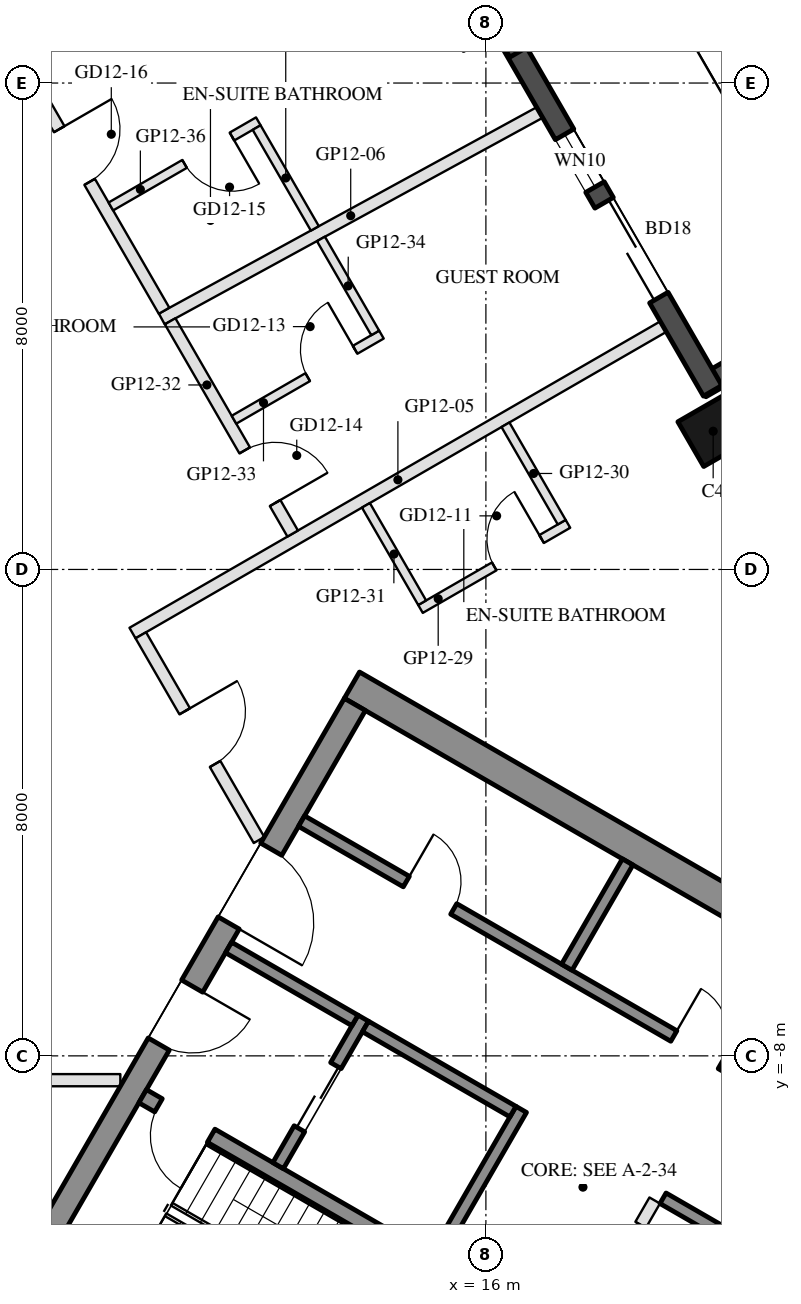
"""IFC4 building model, lengths in metres.
Left out: names, types, materials, properties, quantities, classifications, styles, units other than length and angle.
Written with IfcOpenShell. Run it as: python <this file> out.ifc"""

import sys

from ifc_helpers import new_model, si_unit, direction, frame, frame_2d, origin, origin_2d, place, context, subcontext, project, spatial, rectangle, hollow_rectangle, extrude, element, fill, save


model = new_model("IFC4")
c1 = context("Model", 3, precision=1e-05, world=origin(), true_north=direction((0.0, 1.0)))
c2 = subcontext(c1, "Body", "Model", "MODEL_VIEW")
j1 = project(units=[si_unit("LENGTHUNIT", "METRE"), si_unit("PLANEANGLEUNIT", "RADIAN")], contexts=[c1])
p1 = place(None, origin())
s1 = spatial("IfcSite", under=j1, at=p1, CompositionType="ELEMENT")
p2 = place(p1, origin())
s2 = spatial("IfcBuilding", under=s1, at=p2, CompositionType="ELEMENT")
p3 = place(p2, frame((0.0, 0.0, 150.3)))
s3 = spatial("IfcBuildingStorey", under=s2, at=p3, CompositionType="ELEMENT", Elevation=150.3)
p4 = place(p3, frame((19.738, 2.273, 0.0), z_axis=(0.0, 0.0, 1.0), x_axis=(-0.5, 0.866025403784, 0.0)))
e1 = element("IfcColumn", 1, at=p4, inside=s3, PredefinedType="COLUMN", context=c2, shape_type="SweptSolid", body=[
    extrude(hollow_rectangle(XDim=0.85, YDim=0.85, WallThickness=0.04, at=origin_2d()), origin(), (0.0, 0.0, 1.0), 3.7),
])
p5 = place(p3, frame((20.588, 3.601, 0.0), z_axis=(0.0, 0.0, 1.0), x_axis=(-0.866005645448, -0.500034220881, 0.0)))
e2 = element("IfcWall", 2, at=p5, inside=s3, PredefinedType="SOLIDWALL", context=c2, shape_type="SweptSolid", body=[
    extrude(rectangle(XDim=1.22, YDim=0.35, at=frame_2d((0.61, 0.0))), origin(), (0.0, 0.0, 1.0), 3.55),
])
p6 = place(p3, frame((19.729, 2.938, 0.0), z_axis=(0.0, 0.0, 1.0), x_axis=(-0.499976430342, 0.866039011305, 0.0)))
e3 = element("IfcWall", 3, at=p6, inside=s3, PredefinedType="SOLIDWALL", context=c2, shape_type="SweptSolid", body=[
    extrude(rectangle(XDim=6.74, YDim=0.35, at=frame_2d((3.37, 0.0))), origin(), (0.0, 0.0, 1.0), 3.55),
])
p7 = place(p6, frame((1.77, 0.0, 0.0)))
e4 = element("IfcOpeningElement", 4, at=p7, cuts=e3, PredefinedType="OPENING", context=c2, shape_type="SweptSolid", body=[
    extrude(rectangle(XDim=1.8, YDim=2.4, at=frame_2d((0.9, 1.2))), frame((0.0, 0.185, 0.0), z_axis=(0.0, -1.0, 0.0), x_axis=(1.0, 0.0, 0.0)), (0.0, 0.0, 1.0), 0.37),
])
p8 = place(p6, frame((3.87, 0.0, 0.3)))
e5 = element("IfcOpeningElement", 5, at=p8, cuts=e3, PredefinedType="OPENING", context=c2, shape_type="SweptSolid", body=[
    extrude(rectangle(XDim=1.0, YDim=2.65, at=frame_2d((0.5, 1.325))), frame((0.0, 0.185, 0.0), z_axis=(0.0, -1.0, 0.0), x_axis=(1.0, 0.0, 0.0)), (0.0, 0.0, 1.0), 0.37),
])
p9 = place(p3, frame((16.306, 8.577, 0.0), z_axis=(0.0, 0.0, 1.0), x_axis=(0.866092288191, 0.499884134912, 0.0)))
e6 = element("IfcWall", 6, at=p9, inside=s3, PredefinedType="SOLIDWALL", context=c2, shape_type="SweptSolid", body=[
    extrude(rectangle(XDim=1.22, YDim=0.35, at=frame_2d((0.61, 0.0))), origin(), (0.0, 0.0, 1.0), 3.55),
])
p10 = place(p3, frame((13.797, -1.903, 0.0), z_axis=(0.0, 0.0, 1.0), x_axis=(0.866025009528, -0.500000682871, 0.0)))
e7 = element("IfcWall", 7, at=p10, inside=s3, PredefinedType="SHEAR", context=c2, shape_type="SweptSolid", body=[
    extrude(rectangle(XDim=14.837, YDim=0.5, at=frame_2d((7.418, 0.0))), origin(), (0.0, 0.0, 1.0), 3.5),
])
p11 = place(p3, frame((8.845, -10.88, 0.0), z_axis=(0.0, 0.0, 1.0), x_axis=(0.500004234368, 0.866022959057, 0.0)))
e8 = element("IfcWall", 8, at=p11, inside=s3, PredefinedType="SHEAR", context=c2, shape_type="SweptSolid", body=[
    extrude(rectangle(XDim=10.0, YDim=0.4, at=frame_2d((5.0, 0.0))), origin(), (0.0, 0.0, 1.0), 3.5),
])
p12 = place(p11, frame((3.55, 0.0, 0.0)))
e9 = element("IfcOpeningElement", 9, at=p12, cuts=e8, PredefinedType="OPENING", context=c2, shape_type="SweptSolid", body=[
    extrude(rectangle(XDim=1.1, YDim=2.1, at=frame_2d((0.55, 1.05))), frame((0.0, 0.21, 0.0), z_axis=(0.0, -1.0, 0.0), x_axis=(1.0, 0.0, 0.0)), (0.0, 0.0, 1.0), 0.42),
])
p13 = place(p11, frame((5.85, 0.0, 0.0)))
e10 = element("IfcOpeningElement", 10, at=p13, cuts=e8, PredefinedType="OPENING", context=c2, shape_type="SweptSolid", body=[
    extrude(rectangle(XDim=1.4, YDim=2.1, at=frame_2d((0.7, 1.05))), frame((0.0, 0.21, 0.0), z_axis=(0.0, -1.0, 0.0), x_axis=(1.0, 0.0, 0.0)), (0.0, 0.0, 1.0), 0.42),
])
p14 = place(p3, frame((10.356, -8.664, 0.0), z_axis=(0.0, 0.0, 1.0), x_axis=(0.866028629588, -0.499994412703, 0.0)))
e11 = element("IfcWall", 11, at=p14, inside=s3, PredefinedType="SHEAR", context=c2, shape_type="SweptSolid", body=[
    extrude(rectangle(XDim=6.45, YDim=0.25, at=frame_2d((3.225, 0.0))), origin(), (0.0, 0.0, 1.0), 3.5),
])
p15 = place(p14, frame((0.3, 0.0, 0.0)))
e12 = element("IfcOpeningElement", 12, at=p15, cuts=e11, PredefinedType="OPENING", context=c2, shape_type="SweptSolid", body=[
    extrude(rectangle(XDim=1.0, YDim=2.1, at=frame_2d((0.5, 1.05))), frame((0.0, 0.135, 0.0), z_axis=(0.0, -1.0, 0.0), x_axis=(1.0, 0.0, 0.0)), (0.0, 0.0, 1.0), 0.27),
])
p16 = place(p3, frame((15.181, -11.305, 0.0), z_axis=(0.0, 0.0, 1.0), x_axis=(0.49994636267, 0.866056369097, 0.0)))
e13 = element("IfcWall", 13, at=p16, inside=s3, PredefinedType="SHEAR", context=c2, shape_type="SweptSolid", body=[
    extrude(rectangle(XDim=2.8, YDim=0.2, at=frame_2d((1.4, 0.0))), origin(), (0.0, 0.0, 1.0), 3.5),
])
p17 = place(p3, frame((12.583, -9.805, 0.0), z_axis=(0.0, 0.0, 1.0), x_axis=(0.49994636267, 0.866056369097, 0.0)))
e14 = element("IfcWall", 14, at=p17, inside=s3, PredefinedType="SHEAR", context=c2, shape_type="SweptSolid", body=[
    extrude(rectangle(XDim=2.8, YDim=0.2, at=frame_2d((1.4, 0.0))), origin(), (0.0, 0.0, 1.0), 3.5),
])
p18 = place(p17, frame((0.7, 0.0, 0.0)))
e15 = element("IfcOpeningElement", 15, at=p18, cuts=e14, PredefinedType="OPENING", context=c2, shape_type="SweptSolid", body=[
    extrude(rectangle(XDim=1.2, YDim=2.1, at=frame_2d((0.6, 1.05))), frame((0.0, 0.11, 0.0), z_axis=(0.0, -1.0, 0.0), x_axis=(1.0, 0.0, 0.0)), (0.0, 0.0, 1.0), 0.22),
])
p19 = place(p3, frame((11.768, -6.217, 0.0), z_axis=(0.0, 0.0, 1.0), x_axis=(0.866050077142, -0.499957262057, 0.0)))
e16 = element("IfcWall", 16, at=p19, inside=s3, PredefinedType="SHEAR", context=c2, shape_type="SweptSolid", body=[
    extrude(rectangle(XDim=2.4, YDim=0.2, at=frame_2d((1.2, 0.0))), origin(), (0.0, 0.0, 1.0), 3.5),
])
p20 = place(p3, frame((14.02, -7.517, 0.0), z_axis=(0.0, 0.0, 1.0), x_axis=(0.866034573852, -0.49998411664, 0.0)))
e17 = element("IfcWall", 17, at=p20, inside=s3, PredefinedType="SHEAR", context=c2, shape_type="SweptSolid", body=[
    extrude(rectangle(XDim=2.8, YDim=0.2, at=frame_2d((1.4, 0.0))), origin(), (0.0, 0.0, 1.0), 3.5),
])
p21 = place(p3, frame((12.968, -4.138, 0.0), z_axis=(0.0, 0.0, 1.0), x_axis=(0.866028328073, -0.49999493495, 0.0)))
e18 = element("IfcWall", 18, at=p21, inside=s3, PredefinedType="SHEAR", context=c2, shape_type="SweptSolid", body=[
    extrude(rectangle(XDim=10.16, YDim=0.2, at=frame_2d((5.08, 0.0))), origin(), (0.0, 0.0, 1.0), 3.5),
])
p22 = place(p21, frame((1.99, 0.0, 0.0)))
e19 = element("IfcOpeningElement", 19, at=p22, cuts=e18, PredefinedType="OPENING", context=c2, shape_type="SweptSolid", body=[
    extrude(rectangle(XDim=0.9, YDim=2.1, at=frame_2d((0.45, 1.05))), frame((0.0, 0.11, 0.0), z_axis=(0.0, -1.0, 0.0), x_axis=(1.0, 0.0, 0.0)), (0.0, 0.0, 1.0), 0.22),
])
p23 = place(p21, frame((7.07, 0.0, 0.0)))
e20 = element("IfcOpeningElement", 20, at=p23, cuts=e18, PredefinedType="OPENING", context=c2, shape_type="SweptSolid", body=[
    extrude(rectangle(XDim=0.9, YDim=2.1, at=frame_2d((0.45, 1.05))), frame((0.0, 0.11, 0.0), z_axis=(0.0, -1.0, 0.0), x_axis=(1.0, 0.0, 0.0)), (0.0, 0.0, 1.0), 0.22),
])
p24 = place(p3, frame((18.913, -10.342, 0.0), z_axis=(0.0, 0.0, 1.0), x_axis=(0.866038183914, -0.499977863513, 0.0)))
e21 = element("IfcWall", 21, at=p24, inside=s3, PredefinedType="SHEAR", context=c2, shape_type="SweptSolid", body=[
    extrude(rectangle(XDim=1.71, YDim=0.2, at=frame_2d((0.855, 0.0))), origin(), (0.0, 0.0, 1.0), 3.5),
])
p25 = place(p3, frame((17.331, -6.542, 0.0), z_axis=(0.0, 0.0, 1.0), x_axis=(0.499972520799, 0.866041268327, 0.0)))
e22 = element("IfcWall", 22, at=p25, inside=s3, PredefinedType="SHEAR", context=c2, shape_type="SweptSolid", body=[
    extrude(rectangle(XDim=2.0, YDim=0.2, at=frame_2d((1.0, 0.0))), origin(), (0.0, 0.0, 1.0), 3.5),
])
p26 = place(p3, frame((16.076, -15.055, 0.0), z_axis=(0.0, 0.0, 1.0), x_axis=(0.499995103361, 0.866028230842, 0.0)))
e23 = element("IfcWall", 23, at=p26, inside=s3, PredefinedType="PARTITIONING", context=c2, shape_type="SweptSolid", body=[
    extrude(rectangle(XDim=5.4, YDim=0.2, at=frame_2d((2.7, 0.0))), origin(), (0.0, 0.0, 1.0), 3.5),
])
p27 = place(p26, frame((2.163, 0.0, 0.0)))
e24 = element("IfcOpeningElement", 24, at=p27, cuts=e23, PredefinedType="OPENING", context=c2, shape_type="SweptSolid", body=[
    extrude(rectangle(XDim=0.9, YDim=2.1, at=frame_2d((0.45, 1.05))), frame((0.0, 0.11, 0.0), z_axis=(0.0, -1.0, 0.0), x_axis=(1.0, 0.0, 0.0)), (0.0, 0.0, 1.0), 0.22),
])
p28 = place(p26, frame((4.038, 0.0, 0.0)))
e25 = element("IfcOpeningElement", 25, at=p28, cuts=e23, PredefinedType="OPENING", context=c2, shape_type="SweptSolid", body=[
    extrude(rectangle(XDim=0.9, YDim=2.1, at=frame_2d((0.45, 1.05))), frame((0.0, 0.11, 0.0), z_axis=(0.0, -1.0, 0.0), x_axis=(1.0, 0.0, 0.0)), (0.0, 0.0, 1.0), 0.22),
])
p29 = place(p3, frame((18.917, 3.994, 0.0), z_axis=(0.0, 0.0, 1.0), x_axis=(-0.866022637375, -0.500004791531, 0.0)))
e26 = element("IfcWall", 26, at=p29, inside=s3, PredefinedType="PARTITIONING", context=c2, shape_type="SweptSolid", body=[
    extrude(rectangle(XDim=10.08, YDim=0.2, at=frame_2d((5.04, 0.0))), origin(), (0.0, 0.0, 1.0), 3.06),
])
p30 = place(p3, frame((16.885, 7.515, 0.0), z_axis=(0.0, 0.0, 1.0), x_axis=(-0.87760821498, -0.479378577952, 0.0)))
e27 = element("IfcWall", 27, at=p30, inside=s3, PredefinedType="PARTITIONING", context=c2, shape_type="SweptSolid", body=[
    extrude(rectangle(XDim=7.082, YDim=0.2, at=frame_2d((3.541, 0.0))), origin(), (0.0, 0.0, 1.0), 3.06),
])
p31 = place(p3, frame((9.988, -8.4, 0.0), z_axis=(0.0, 0.0, 1.0), x_axis=(-1.0, 0.0, 0.0)))
e28 = element("IfcWall", 28, at=p31, inside=s3, PredefinedType="PARTITIONING", context=c2, shape_type="SweptSolid", body=[
    extrude(rectangle(XDim=3.788, YDim=0.2, at=frame_2d((1.894, 0.0))), origin(), (0.0, 0.0, 1.0), 2.95),
])
p32 = place(p31, frame((1.394, 0.0, 0.0)))
e29 = element("IfcOpeningElement", 29, at=p32, cuts=e28, PredefinedType="OPENING", context=c2, shape_type="SweptSolid", body=[
    extrude(rectangle(XDim=1.0, YDim=2.1, at=frame_2d((0.5, 1.05))), frame((0.0, 0.11, 0.0), z_axis=(0.0, -1.0, 0.0), x_axis=(1.0, 0.0, 0.0)), (0.0, 0.0, 1.0), 0.22),
])
p33 = place(p3, frame((10.325, -1.083, 0.0), z_axis=(0.0, 0.0, 1.0), x_axis=(0.500008716408, -0.866020371305, 0.0)))
e30 = element("IfcWall", 30, at=p33, inside=s3, PredefinedType="PARTITIONING", context=c2, shape_type="SweptSolid", body=[
    extrude(rectangle(XDim=3.888, YDim=0.2, at=frame_2d((1.944, 0.0))), origin(), (0.0, 0.0, 1.0), 2.95),
])
p34 = place(p33, frame((1.444, 0.0, 0.0)))
e31 = element("IfcOpeningElement", 31, at=p34, cuts=e30, PredefinedType="OPENING", context=c2, shape_type="SweptSolid", body=[
    extrude(rectangle(XDim=1.0, YDim=2.1, at=frame_2d((0.5, 1.05))), frame((0.0, 0.11, 0.0), z_axis=(0.0, -1.0, 0.0), x_axis=(1.0, 0.0, 0.0)), (0.0, 0.0, 1.0), 0.22),
])
p35 = place(p3, frame((14.924, -0.65, 0.0), z_axis=(0.0, 0.0, 1.0), x_axis=(0.866056369097, 0.49994636267, 0.0)))
e32 = element("IfcWall", 32, at=p35, inside=s3, PredefinedType="PARTITIONING", context=c2, shape_type="SweptSolid", body=[
    extrude(rectangle(XDim=2.8, YDim=0.15, at=frame_2d((1.4, 0.0))), origin(), (0.0, 0.0, 1.0), 2.95),
])
p36 = place(p35, frame((1.4, 0.0, 0.0)))
e33 = element("IfcOpeningElement", 33, at=p36, cuts=e32, PredefinedType="OPENING", context=c2, shape_type="SweptSolid", body=[
    extrude(rectangle(XDim=0.9, YDim=2.1, at=frame_2d((0.45, 1.05))), frame((0.0, 0.085, 0.0), z_axis=(0.0, -1.0, 0.0), x_axis=(1.0, 0.0, 0.0)), (0.0, 0.0, 1.0), 0.17),
])
for number, where, z_axis, x_axis in (
    (34, (17.247, 0.778, 0.0), (0.0, 0.0, 1.0), (-0.5, 0.866, 0.0)),
    (35, (14.952, -0.547, 0.0), (0.0, 0.0, 1.0), (-0.5, 0.866, 0.0)),
):
    element("IfcWall", number, at=place(p3, frame(where, z_axis=z_axis, x_axis=x_axis)), inside=s3, PredefinedType="PARTITIONING", context=c2, shape_type="SweptSolid", body=[
        extrude(rectangle(XDim=1.85, YDim=0.15, at=frame_2d((0.925, 0.0))), origin(), (0.0, 0.0, 1.0), 2.95),
    ])
p37 = place(p3, frame((10.807, 4.082, 0.0), z_axis=(0.0, 0.0, 1.0), x_axis=(0.500040475235, -0.866002034136, 0.0)))
e36 = element("IfcWall", 36, at=p37, inside=s3, PredefinedType="PARTITIONING", context=c2, shape_type="SweptSolid", body=[
    extrude(rectangle(XDim=4.031, YDim=0.2, at=frame_2d((2.016, 0.0))), origin(), (0.0, 0.0, 1.0), 2.95),
])
p38 = place(p37, frame((2.452, 0.0, 0.0)))
e37 = element("IfcOpeningElement", 37, at=p38, cuts=e36, PredefinedType="OPENING", context=c2, shape_type="SweptSolid", body=[
    extrude(rectangle(XDim=1.0, YDim=2.1, at=frame_2d((0.5, 1.05))), frame((0.0, 0.11, 0.0), z_axis=(0.0, -1.0, 0.0), x_axis=(1.0, 0.0, 0.0)), (0.0, 0.0, 1.0), 0.22),
])
p39 = place(p3, frame((11.857, 2.463, 0.0), z_axis=(0.0, 0.0, 1.0), x_axis=(0.866034573852, 0.49998411664, 0.0)))
e38 = element("IfcWall", 38, at=p39, inside=s3, PredefinedType="PARTITIONING", context=c2, shape_type="SweptSolid", body=[
    extrude(rectangle(XDim=2.8, YDim=0.15, at=frame_2d((1.4, 0.0))), origin(), (0.0, 0.0, 1.0), 2.95),
])
p40 = place(p39, frame((1.4, 0.0, 0.0)))
e39 = element("IfcOpeningElement", 39, at=p40, cuts=e38, PredefinedType="OPENING", context=c2, shape_type="SweptSolid", body=[
    extrude(rectangle(XDim=0.9, YDim=2.1, at=frame_2d((0.45, 1.05))), frame((0.0, 0.085, 0.0), z_axis=(0.0, -1.0, 0.0), x_axis=(1.0, 0.0, 0.0)), (0.0, 0.0, 1.0), 0.17),
])
p41 = place(p3, frame((14.18, 3.89, 0.0), z_axis=(0.0, 0.0, 1.0), x_axis=(-0.500006500783, 0.866021650523, 0.0)))
e40 = element("IfcWall", 40, at=p41, inside=s3, PredefinedType="PARTITIONING", context=c2, shape_type="SweptSolid", body=[
    extrude(rectangle(XDim=1.786, YDim=0.15, at=frame_2d((0.893, 0.0))), origin(), (0.0, 0.0, 1.0), 3.55),
])
p42 = place(p3, frame((6.923, 10.81, 0.0), z_axis=(0.0, 0.0, 1.0), x_axis=(0.500007257026, -0.866021213898, 0.0)))
e41 = element("IfcWall", 41, at=p42, inside=s3, PredefinedType="PARTITIONING", context=c2, shape_type="SweptSolid", body=[
    extrude(rectangle(XDim=7.569, YDim=0.2, at=frame_2d((3.784, 0.0))), origin(), (0.0, 0.0, 1.0), 2.95),
])
p43 = place(p42, frame((4.121, 0.0, 0.0)))
e42 = element("IfcOpeningElement", 42, at=p43, cuts=e41, PredefinedType="OPENING", context=c2, shape_type="SweptSolid", body=[
    extrude(rectangle(XDim=1.0, YDim=2.1, at=frame_2d((0.5, 1.05))), frame((0.0, 0.11, 0.0), z_axis=(0.0, -1.0, 0.0), x_axis=(1.0, 0.0, 0.0)), (0.0, 0.0, 1.0), 0.22),
])
p44 = place(p3, frame((12.257, 7.37, 0.0), z_axis=(0.0, 0.0, 1.0), x_axis=(-0.865996816683, -0.500049511043, 0.0)))
e43 = element("IfcWall", 43, at=p44, inside=s3, PredefinedType="PARTITIONING", context=c2, shape_type="SweptSolid", body=[
    extrude(rectangle(XDim=2.8, YDim=0.15, at=frame_2d((1.4, 0.0))), origin(), (0.0, 0.0, 1.0), 3.55),
])
p45 = place(p44, frame((0.5, 0.0, 0.0)))
e44 = element("IfcOpeningElement", 44, at=p45, cuts=e43, PredefinedType="OPENING", context=c2, shape_type="SweptSolid", body=[
    extrude(rectangle(XDim=0.9, YDim=2.1, at=frame_2d((0.45, 1.05))), frame((0.0, 0.085, 0.0), z_axis=(0.0, -1.0, 0.0), x_axis=(1.0, 0.0, 0.0)), (0.0, 0.0, 1.0), 0.17),
])
p46 = place(p3, frame((13.187, 5.61, 0.0), z_axis=(0.0, 0.0, 1.0), x_axis=(-0.500020498207, 0.866013568815, 0.0)))
e45 = element("IfcWall", 45, at=p46, inside=s3, PredefinedType="PARTITIONING", context=c2, shape_type="SweptSolid", body=[
    extrude(rectangle(XDim=1.915, YDim=0.15, at=frame_2d((0.957, 0.0))), origin(), (0.0, 0.0, 1.0), 2.95),
])
p47 = place(p7, frame((1.8, 0.0, 0.0), z_axis=(0.0, 0.0, 1.0), x_axis=(-1.0, 0.0, 0.0)))
e46 = element("IfcDoor", 46, at=p47, inside=s3, OperationType="SLIDING_TO_LEFT", PredefinedType="DOOR", context=c2, shape_type="SweptSolid", body=[
    extrude(rectangle(XDim=1.8, YDim=2.4, at=frame_2d((0.9, 1.2))), frame((0.0, 0.025, 0.0), z_axis=(0.0, -1.0, 0.0), x_axis=(1.0, 0.0, 0.0)), (0.0, 0.0, 1.0), 0.05),
])
fill(e4, e46)
p48 = place(p8, origin())
e47 = element("IfcWindow", 47, at=p48, inside=s3, PartitioningType="SINGLE_PANEL", PredefinedType="WINDOW", context=c2, shape_type="SweptSolid", body=[
    extrude(rectangle(XDim=1.0, YDim=2.65, at=frame_2d((0.5, 1.325))), frame((0.0, 0.03, 0.0), z_axis=(0.0, -1.0, 0.0), x_axis=(1.0, 0.0, 0.0)), (0.0, 0.0, 1.0), 0.06),
])
fill(e5, e47)
p49 = place(p18, origin())
e48 = element("IfcDoor", 48, at=p49, inside=s3, OperationType="DOUBLE_DOOR_SLIDING", PredefinedType="DOOR", context=c2, shape_type="SweptSolid", body=[
    extrude(rectangle(XDim=1.2, YDim=2.1, at=frame_2d((0.6, 1.05))), frame((0.0, 0.025, 0.0), z_axis=(0.0, -1.0, 0.0), x_axis=(1.0, 0.0, 0.0)), (0.0, 0.0, 1.0), 0.05),
])
fill(e15, e48)
p50 = place(p22, origin())
e49 = element("IfcDoor", 49, at=p50, inside=s3, OperationType="SINGLE_SWING_LEFT", PredefinedType="DOOR", context=c2, shape_type="SweptSolid", body=[
    extrude(rectangle(XDim=0.9, YDim=2.1, at=frame_2d((0.45, 1.05))), frame((0.0, 0.025, 0.0), z_axis=(0.0, -1.0, 0.0), x_axis=(1.0, 0.0, 0.0)), (0.0, 0.0, 1.0), 0.05),
])
fill(e19, e49)
p51 = place(p23, origin())
e50 = element("IfcDoor", 50, at=p51, inside=s3, OperationType="SINGLE_SWING_LEFT", PredefinedType="DOOR", context=c2, shape_type="SweptSolid", body=[
    extrude(rectangle(XDim=0.9, YDim=2.1, at=frame_2d((0.45, 1.05))), frame((0.0, 0.025, 0.0), z_axis=(0.0, -1.0, 0.0), x_axis=(1.0, 0.0, 0.0)), (0.0, 0.0, 1.0), 0.05),
])
fill(e20, e50)
p52 = place(p12, frame((1.1, 0.0, 0.0), z_axis=(0.0, 0.0, 1.0), x_axis=(-1.0, 0.0, 0.0)))
e51 = element("IfcDoor", 51, at=p52, inside=s3, OperationType="SINGLE_SWING_LEFT", PredefinedType="DOOR", context=c2, shape_type="SweptSolid", body=[
    extrude(rectangle(XDim=1.1, YDim=2.1, at=frame_2d((0.55, 1.05))), frame((0.0, 0.025, 0.0), z_axis=(0.0, -1.0, 0.0), x_axis=(1.0, 0.0, 0.0)), (0.0, 0.0, 1.0), 0.05),
])
fill(e9, e51)
p53 = place(p13, frame((1.4, 0.0, 0.0), z_axis=(0.0, 0.0, 1.0), x_axis=(-1.0, 0.0, 0.0)))
e52 = element("IfcDoor", 52, at=p53, inside=s3, OperationType="DOUBLE_DOOR_SINGLE_SWING", PredefinedType="DOOR", context=c2, shape_type="SweptSolid", body=[
    extrude(rectangle(XDim=1.4, YDim=2.1, at=frame_2d((0.7, 1.05))), frame((0.0, 0.025, 0.0), z_axis=(0.0, -1.0, 0.0), x_axis=(1.0, 0.0, 0.0)), (0.0, 0.0, 1.0), 0.05),
])
fill(e10, e52)
p54 = place(p15, frame((1.0, 0.0, 0.0), z_axis=(0.0, 0.0, 1.0), x_axis=(-1.0, 0.0, 0.0)))
e53 = element("IfcDoor", 53, at=p54, inside=s3, OperationType="SINGLE_SWING_LEFT", PredefinedType="DOOR", context=c2, shape_type="SweptSolid", body=[
    extrude(rectangle(XDim=1.0, YDim=2.1, at=frame_2d((0.5, 1.05))), frame((0.0, 0.025, 0.0), z_axis=(0.0, -1.0, 0.0), x_axis=(1.0, 0.0, 0.0)), (0.0, 0.0, 1.0), 0.05),
])
fill(e12, e53)
p55 = place(p36, origin())
e54 = element("IfcDoor", 54, at=p55, inside=s3, OperationType="SINGLE_SWING_RIGHT", PredefinedType="DOOR", context=c2, shape_type="SweptSolid", body=[
    extrude(rectangle(XDim=0.9, YDim=2.1, at=frame_2d((0.45, 1.05))), frame((0.0, 0.025, 0.0), z_axis=(0.0, -1.0, 0.0), x_axis=(1.0, 0.0, 0.0)), (0.0, 0.0, 1.0), 0.05),
])
fill(e33, e54)
p56 = place(p34, origin())
e55 = element("IfcDoor", 55, at=p56, inside=s3, OperationType="SINGLE_SWING_LEFT", PredefinedType="DOOR", context=c2, shape_type="SweptSolid", body=[
    extrude(rectangle(XDim=1.0, YDim=2.1, at=frame_2d((0.5, 1.05))), frame((0.0, 0.025, 0.0), z_axis=(0.0, -1.0, 0.0), x_axis=(1.0, 0.0, 0.0)), (0.0, 0.0, 1.0), 0.05),
])
fill(e31, e55)
p57 = place(p40, origin())
e56 = element("IfcDoor", 56, at=p57, inside=s3, OperationType="SINGLE_SWING_RIGHT", PredefinedType="DOOR", context=c2, shape_type="SweptSolid", body=[
    extrude(rectangle(XDim=0.9, YDim=2.1, at=frame_2d((0.45, 1.05))), frame((0.0, 0.025, 0.0), z_axis=(0.0, -1.0, 0.0), x_axis=(1.0, 0.0, 0.0)), (0.0, 0.0, 1.0), 0.05),
])
fill(e39, e56)
p58 = place(p38, origin())
e57 = element("IfcDoor", 57, at=p58, inside=s3, OperationType="SINGLE_SWING_RIGHT", PredefinedType="DOOR", context=c2, shape_type="SweptSolid", body=[
    extrude(rectangle(XDim=1.0, YDim=2.1, at=frame_2d((0.5, 1.05))), frame((0.0, 0.025, 0.0), z_axis=(0.0, -1.0, 0.0), x_axis=(1.0, 0.0, 0.0)), (0.0, 0.0, 1.0), 0.05),
])
fill(e37, e57)
p59 = place(p45, origin())
e58 = element("IfcDoor", 58, at=p59, inside=s3, OperationType="SINGLE_SWING_LEFT", PredefinedType="DOOR", context=c2, shape_type="SweptSolid", body=[
    extrude(rectangle(XDim=0.9, YDim=2.1, at=frame_2d((0.45, 1.05))), frame((0.0, 0.025, 0.0), z_axis=(0.0, -1.0, 0.0), x_axis=(1.0, 0.0, 0.0)), (0.0, 0.0, 1.0), 0.05),
])
fill(e44, e58)
p60 = place(p43, origin())
e59 = element("IfcDoor", 59, at=p60, inside=s3, OperationType="SINGLE_SWING_LEFT", PredefinedType="DOOR", context=c2, shape_type="SweptSolid", body=[
    extrude(rectangle(XDim=1.0, YDim=2.1, at=frame_2d((0.5, 1.05))), frame((0.0, 0.025, 0.0), z_axis=(0.0, -1.0, 0.0), x_axis=(1.0, 0.0, 0.0)), (0.0, 0.0, 1.0), 0.05),
])
fill(e42, e59)
save(model, sys.argv[1])
